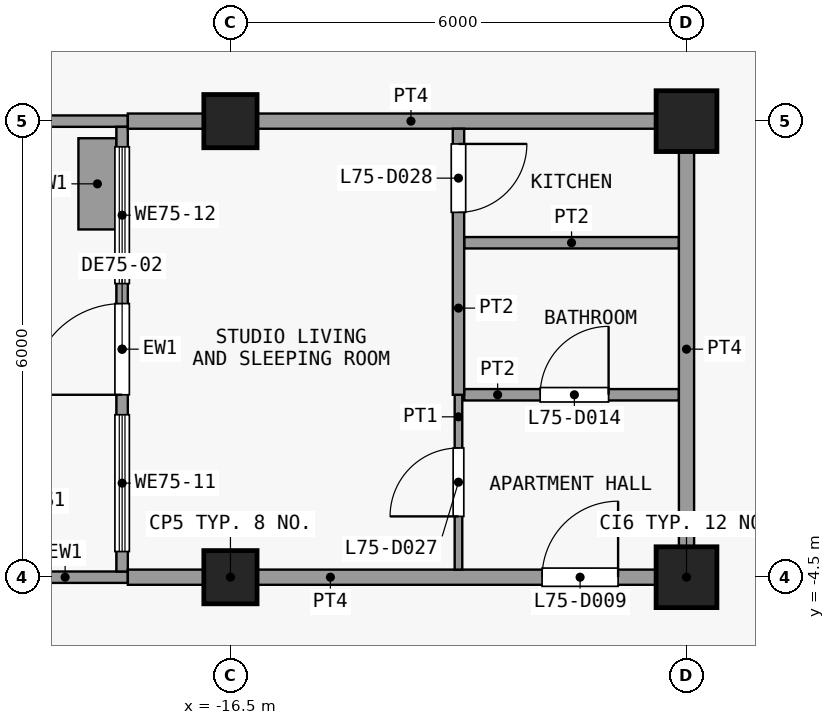
"""IFC4 building model, lengths in metres.
Left out: names, types, materials, properties, quantities, classifications, styles, units other than length and angle.
Written with IfcOpenShell. Run it as: python <this file> out.ifc"""

import sys

from ifc_helpers import new_model, si_unit, direction, frame, frame_2d, origin, origin_2d, place, context, subcontext, project, spatial, rectangle, extrude, element, fill, save


model = new_model("IFC4")
c1 = context("Model", 3, precision=1e-05, world=origin(), true_north=direction((0.0, 1.0)))
c2 = subcontext(c1, "Body", "Model", "MODEL_VIEW")
j1 = project(units=[si_unit("LENGTHUNIT", "METRE"), si_unit("PLANEANGLEUNIT", "RADIAN")], contexts=[c1])
p1 = place(None, origin())
s1 = spatial("IfcSite", under=j1, at=p1, CompositionType="ELEMENT")
p2 = place(p1, origin())
s2 = spatial("IfcBuilding", under=s1, at=p2, CompositionType="ELEMENT")
p3 = place(p2, frame((0.0, 0.0, 295.1)))
s3 = spatial("IfcBuildingStorey", under=s2, at=p3, CompositionType="ELEMENT", Elevation=295.1)
for number, where, z_axis, x_axis in (
    (1, (-16.5, -4.5, 0.0), (0.0, 0.0, 1.0), (1.0, 0.0, 0.0)),
    (2, (-16.5, 1.5, 0.0), (0.0, 0.0, 1.0), (1.0, 0.0, 0.0)),
):
    element("IfcColumn", number, at=place(p3, frame(where, z_axis=z_axis, x_axis=x_axis)), inside=s3, PredefinedType="COLUMN", context=c2, shape_type="SweptSolid", body=[
        extrude(rectangle(XDim=0.7, YDim=0.7, at=origin_2d()), origin(), (0.0, 0.0, 1.0), 3.6),
    ])
for number, where, z_axis, x_axis in (
    (3, (-10.5, -4.5, 0.0), (0.0, 0.0, 1.0), (1.0, 0.0, 0.0)),
    (4, (-10.5, 1.5, 0.0), (0.0, 0.0, 1.0), (1.0, 0.0, 0.0)),
):
    element("IfcColumn", number, at=place(p3, frame(where, z_axis=z_axis, x_axis=x_axis)), inside=s3, PredefinedType="COLUMN", context=c2, shape_type="SweptSolid", body=[
        extrude(rectangle(XDim=0.8, YDim=0.8, at=origin_2d()), origin(), (0.0, 0.0, 1.0), 3.6),
    ])
p4 = place(p3, frame((-17.85, -4.5, 0.0), z_axis=(0.0, 0.0, 1.0), x_axis=(-1.0, 0.0, 0.0)))
e5 = element("IfcWall", 5, at=p4, inside=s3, PredefinedType="SOLIDWALL", context=c2, shape_type="SweptSolid", body=[
    extrude(rectangle(XDim=1.65, YDim=0.15, at=frame_2d((0.825, 0.0))), origin(), (0.0, 0.0, 1.0), 3.2),
])
p5 = place(p3, frame((-17.85, 1.5, 0.0), z_axis=(0.0, 0.0, 1.0), x_axis=(-1.0, 0.0, 0.0)))
e6 = element("IfcWall", 6, at=p5, inside=s3, PredefinedType="SOLIDWALL", context=c2, shape_type="SweptSolid", body=[
    extrude(rectangle(XDim=2.55, YDim=0.15, at=frame_2d((1.275, 0.0))), origin(), (0.0, 0.0, 1.0), 3.2),
])
p6 = place(p3, frame((-17.925, -4.425, 0.0), z_axis=(0.0, 0.0, 1.0), x_axis=(0.0, 1.0, 0.0)))
e7 = element("IfcWall", 7, at=p6, inside=s3, PredefinedType="SOLIDWALL", context=c2, shape_type="SweptSolid", body=[
    extrude(rectangle(XDim=5.85, YDim=0.15, at=frame_2d((2.925, 0.0))), origin(), (0.0, 0.0, 1.0), 3.2),
])
p7 = place(p6, frame((2.325, 0.0, 0.0)))
e8 = element("IfcOpeningElement", 8, at=p7, cuts=e7, PredefinedType="OPENING", context=c2, shape_type="SweptSolid", body=[
    extrude(rectangle(XDim=1.2, YDim=2.4, at=frame_2d((0.6, 1.2))), frame((0.0, 0.085, 0.0), z_axis=(0.0, -1.0, 0.0), x_axis=(1.0, 0.0, 0.0)), (0.0, 0.0, 1.0), 0.17),
])
p8 = place(p6, frame((0.262, 0.0, 0.9)))
e9 = element("IfcOpeningElement", 9, at=p8, cuts=e7, PredefinedType="OPENING", context=c2, shape_type="SweptSolid", body=[
    extrude(rectangle(XDim=1.8, YDim=2.1, at=frame_2d((0.9, 1.05))), frame((0.0, 0.085, 0.0), z_axis=(0.0, -1.0, 0.0), x_axis=(1.0, 0.0, 0.0)), (0.0, 0.0, 1.0), 0.17),
])
p9 = place(p6, frame((3.788, 0.0, 0.9)))
e10 = element("IfcOpeningElement", 10, at=p9, cuts=e7, PredefinedType="OPENING", context=c2, shape_type="SweptSolid", body=[
    extrude(rectangle(XDim=1.8, YDim=2.1, at=frame_2d((0.9, 1.05))), frame((0.0, 0.085, 0.0), z_axis=(0.0, -1.0, 0.0), x_axis=(1.0, 0.0, 0.0)), (0.0, 0.0, 1.0), 0.17),
])
p10 = place(p3, frame((-18.25, 0.075, 0.0), z_axis=(0.0, 0.0, 1.0), x_axis=(0.0, 1.0, 0.0)))
e11 = element("IfcWall", 11, at=p10, inside=s3, PredefinedType="USERDEFINED", context=c2, shape_type="SweptSolid", body=[
    extrude(rectangle(XDim=1.2, YDim=0.5, at=frame_2d((0.6, 0.0))), origin(), (0.0, 0.0, 1.0), 0.9),
])
p11 = place(p3, frame((-17.85, -4.5, 0.0), z_axis=(0.0, 0.0, 1.0), x_axis=(1.0, 0.0, 0.0)))
e12 = element("IfcWall", 12, at=p11, inside=s3, PredefinedType="PARTITIONING", context=c2, shape_type="SweptSolid", body=[
    extrude(rectangle(XDim=7.45, YDim=0.2, at=frame_2d((3.725, 0.0))), origin(), (0.0, 0.0, 1.0), 3.2),
])
p12 = place(p11, frame((5.45, 0.0, 0.0)))
e13 = element("IfcOpeningElement", 13, at=p12, cuts=e12, PredefinedType="OPENING", context=c2, shape_type="SweptSolid", body=[
    extrude(rectangle(XDim=1.0, YDim=2.1, at=frame_2d((0.5, 1.05))), frame((0.0, 0.11, 0.0), z_axis=(0.0, -1.0, 0.0), x_axis=(1.0, 0.0, 0.0)), (0.0, 0.0, 1.0), 0.22),
])
p13 = place(p3, frame((-13.425, -2.1, 0.0), z_axis=(0.0, 0.0, 1.0), x_axis=(1.0, 0.0, 0.0)))
e14 = element("IfcWall", 14, at=p13, inside=s3, PredefinedType="PARTITIONING", context=c2, shape_type="SweptSolid", body=[
    extrude(rectangle(XDim=2.825, YDim=0.15, at=frame_2d((1.413, 0.0))), origin(), (0.0, 0.0, 1.0), 3.2),
])
p14 = place(p13, frame((1.0, 0.0, 0.0)))
e15 = element("IfcOpeningElement", 15, at=p14, cuts=e14, PredefinedType="OPENING", context=c2, shape_type="SweptSolid", body=[
    extrude(rectangle(XDim=0.9, YDim=2.1, at=frame_2d((0.45, 1.05))), frame((0.0, 0.085, 0.0), z_axis=(0.0, -1.0, 0.0), x_axis=(1.0, 0.0, 0.0)), (0.0, 0.0, 1.0), 0.17),
])
p15 = place(p3, frame((-13.425, -0.1, 0.0), z_axis=(0.0, 0.0, 1.0), x_axis=(1.0, 0.0, 0.0)))
e16 = element("IfcWall", 16, at=p15, inside=s3, PredefinedType="PARTITIONING", context=c2, shape_type="SweptSolid", body=[
    extrude(rectangle(XDim=2.825, YDim=0.15, at=frame_2d((1.413, 0.0))), origin(), (0.0, 0.0, 1.0), 3.2),
])
p16 = place(p3, frame((-17.85, 1.5, 0.0), z_axis=(0.0, 0.0, 1.0), x_axis=(1.0, 0.0, 0.0)))
e17 = element("IfcWall", 17, at=p16, inside=s3, PredefinedType="PARTITIONING", context=c2, shape_type="SweptSolid", body=[
    extrude(rectangle(XDim=7.45, YDim=0.2, at=frame_2d((3.725, 0.0))), origin(), (0.0, 0.0, 1.0), 3.2),
])
p17 = place(p3, frame((-13.5, -4.4, 0.0), z_axis=(0.0, 0.0, 1.0), x_axis=(0.0, 1.0, 0.0)))
e18 = element("IfcWall", 18, at=p17, inside=s3, PredefinedType="PARTITIONING", context=c2, shape_type="SweptSolid", body=[
    extrude(rectangle(XDim=2.3, YDim=0.1, at=frame_2d((1.15, 0.0))), origin(), (0.0, 0.0, 1.0), 3.2),
])
p18 = place(p17, frame((0.7, 0.0, 0.0)))
e19 = element("IfcOpeningElement", 19, at=p18, cuts=e18, PredefinedType="OPENING", context=c2, shape_type="SweptSolid", body=[
    extrude(rectangle(XDim=0.9, YDim=2.1, at=frame_2d((0.45, 1.05))), frame((0.0, 0.06, 0.0), z_axis=(0.0, -1.0, 0.0), x_axis=(1.0, 0.0, 0.0)), (0.0, 0.0, 1.0), 0.12),
])
p19 = place(p3, frame((-13.5, -2.1, 0.0), z_axis=(0.0, 0.0, 1.0), x_axis=(0.0, 1.0, 0.0)))
e20 = element("IfcWall", 20, at=p19, inside=s3, PredefinedType="PARTITIONING", context=c2, shape_type="SweptSolid", body=[
    extrude(rectangle(XDim=3.5, YDim=0.15, at=frame_2d((1.75, 0.0))), origin(), (0.0, 0.0, 1.0), 3.2),
])
p20 = place(p19, frame((2.4, 0.0, 0.0)))
e21 = element("IfcOpeningElement", 21, at=p20, cuts=e20, PredefinedType="OPENING", context=c2, shape_type="SweptSolid", body=[
    extrude(rectangle(XDim=0.9, YDim=2.1, at=frame_2d((0.45, 1.05))), frame((0.0, 0.085, 0.0), z_axis=(0.0, -1.0, 0.0), x_axis=(1.0, 0.0, 0.0)), (0.0, 0.0, 1.0), 0.17),
])
p21 = place(p3, frame((-10.5, -4.4, 0.0), z_axis=(0.0, 0.0, 1.0), x_axis=(0.0, 1.0, 0.0)))
e22 = element("IfcWall", 22, at=p21, inside=s3, PredefinedType="PARTITIONING", context=c2, shape_type="SweptSolid", body=[
    extrude(rectangle(XDim=5.8, YDim=0.2, at=frame_2d((2.9, 0.0))), origin(), (0.0, 0.0, 1.0), 3.2),
])
p22 = place(p7, origin())
e23 = element("IfcDoor", 23, at=p22, inside=s3, OperationType="SINGLE_SWING_LEFT", PredefinedType="DOOR", context=c2, shape_type="SweptSolid", body=[
    extrude(rectangle(XDim=1.2, YDim=2.4, at=frame_2d((0.6, 1.2))), frame((0.0, 0.025, 0.0), z_axis=(0.0, -1.0, 0.0), x_axis=(1.0, 0.0, 0.0)), (0.0, 0.0, 1.0), 0.05),
])
fill(e8, e23)
p23 = place(p8, origin())
e24 = element("IfcWindow", 24, at=p23, inside=s3, PartitioningType="SINGLE_PANEL", PredefinedType="WINDOW", context=c2, shape_type="SweptSolid", body=[
    extrude(rectangle(XDim=1.8, YDim=2.1, at=frame_2d((0.9, 1.05))), frame((0.0, 0.03, 0.0), z_axis=(0.0, -1.0, 0.0), x_axis=(1.0, 0.0, 0.0)), (0.0, 0.0, 1.0), 0.06),
])
fill(e9, e24)
p24 = place(p9, origin())
e25 = element("IfcWindow", 25, at=p24, inside=s3, PartitioningType="SINGLE_PANEL", PredefinedType="WINDOW", context=c2, shape_type="SweptSolid", body=[
    extrude(rectangle(XDim=1.8, YDim=2.1, at=frame_2d((0.9, 1.05))), frame((0.0, 0.03, 0.0), z_axis=(0.0, -1.0, 0.0), x_axis=(1.0, 0.0, 0.0)), (0.0, 0.0, 1.0), 0.06),
])
fill(e10, e25)
p25 = place(p12, origin())
e26 = element("IfcDoor", 26, at=p25, inside=s3, OperationType="SINGLE_SWING_LEFT", PredefinedType="DOOR", context=c2, shape_type="SweptSolid", body=[
    extrude(rectangle(XDim=1.0, YDim=2.1, at=frame_2d((0.5, 1.05))), frame((0.0, 0.025, 0.0), z_axis=(0.0, -1.0, 0.0), x_axis=(1.0, 0.0, 0.0)), (0.0, 0.0, 1.0), 0.05),
])
fill(e13, e26)
p26 = place(p14, origin())
e27 = element("IfcDoor", 27, at=p26, inside=s3, OperationType="SINGLE_SWING_LEFT", PredefinedType="DOOR", context=c2, shape_type="SweptSolid", body=[
    extrude(rectangle(XDim=0.9, YDim=2.1, at=frame_2d((0.45, 1.05))), frame((0.0, 0.025, 0.0), z_axis=(0.0, -1.0, 0.0), x_axis=(1.0, 0.0, 0.0)), (0.0, 0.0, 1.0), 0.05),
])
fill(e15, e27)
p27 = place(p18, origin())
e28 = element("IfcDoor", 28, at=p27, inside=s3, OperationType="SINGLE_SWING_RIGHT", PredefinedType="DOOR", context=c2, shape_type="SweptSolid", body=[
    extrude(rectangle(XDim=0.9, YDim=2.1, at=frame_2d((0.45, 1.05))), frame((0.0, 0.025, 0.0), z_axis=(0.0, -1.0, 0.0), x_axis=(1.0, 0.0, 0.0)), (0.0, 0.0, 1.0), 0.05),
])
fill(e19, e28)
p28 = place(p20, origin())
e29 = element("IfcDoor", 29, at=p28, inside=s3, OperationType="SINGLE_SWING_RIGHT", PredefinedType="DOOR", context=c2, shape_type="SweptSolid", body=[
    extrude(rectangle(XDim=0.9, YDim=2.1, at=frame_2d((0.45, 1.05))), frame((0.0, 0.025, 0.0), z_axis=(0.0, -1.0, 0.0), x_axis=(1.0, 0.0, 0.0)), (0.0, 0.0, 1.0), 0.05),
])
fill(e21, e29)
save(model, sys.argv[1])
